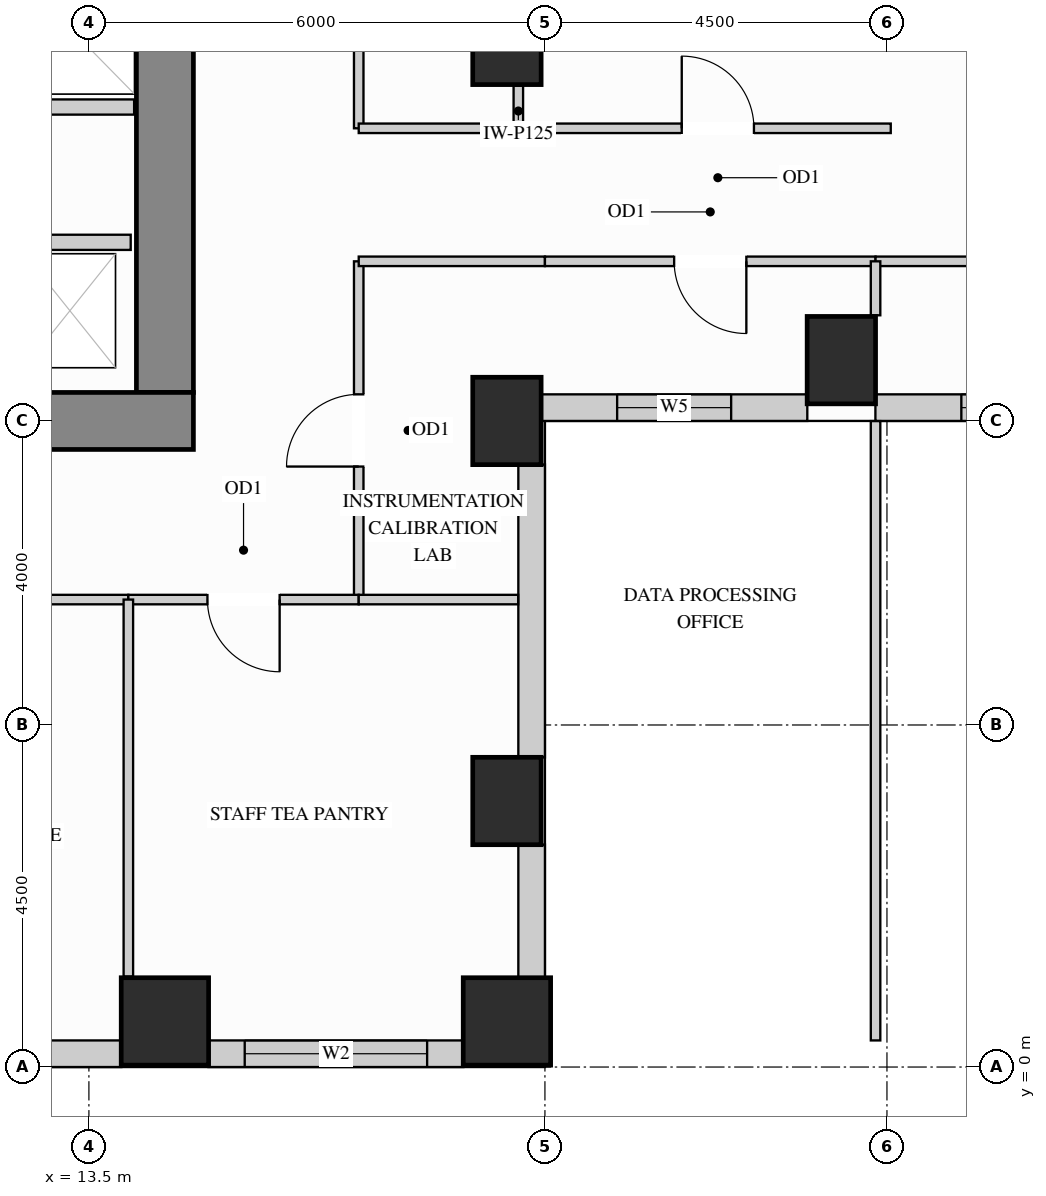
"""IFC4 building model, lengths in metres.
Left out: names, types, materials, properties, quantities, classifications, styles, units other than length and angle.
Written with IfcOpenShell. Run it as: python <this file> out.ifc"""

import sys

from ifc_helpers import new_model, si_unit, direction, frame, frame_2d, origin, origin_2d, place, context, subcontext, project, spatial, rectangle, extrude, source, transform, mapped, element, fill, save


model = new_model("IFC4")
c1 = context("Model", 3, precision=1e-05, world=origin(), true_north=direction((0.0, 1.0)))
c2 = subcontext(c1, "Body", "Model", "MODEL_VIEW")
j1 = project(units=[si_unit("LENGTHUNIT", "METRE"), si_unit("PLANEANGLEUNIT", "RADIAN")], contexts=[c1])
p1 = place(None, origin())
s1 = spatial("IfcSite", under=j1, at=p1, CompositionType="ELEMENT")
p2 = place(p1, origin())
s2 = spatial("IfcBuilding", under=s1, at=p2, CompositionType="ELEMENT")
p3 = place(p2, frame((0.0, 0.0, 120.6)))
s3 = spatial("IfcBuildingStorey", under=s2, at=p3, CompositionType="ELEMENT", Elevation=120.6)
m1 = source(origin(), c2, "Body", "SweptSolid", [
    extrude(rectangle(XDim=0.9, YDim=1.15, at=origin_2d()), origin(), (0.0, 0.0, 1.0), 3.38),
])
for number, where, z_axis, x_axis in (
    (1, (19.0, 13.5, 0.0), (0.0, 0.0, 1.0), (1.0, 0.0, 0.0)),
    (2, (19.0, 3.5, 0.0), (0.0, 0.0, 1.0), (1.0, 0.0, 0.0)),
    (3, (19.0, 8.5, 0.0), (0.0, 0.0, 1.0), (1.0, 0.0, 0.0)),
    (4, (23.4, 9.3, 0.0), (0.0, 0.0, 1.0), (1.0, 0.0, 0.0)),
):
    element("IfcColumn", number, at=place(p3, frame(where, z_axis=z_axis, x_axis=x_axis)), inside=s3, PredefinedType="COLUMN", context=c2, shape_type="MappedRepresentation", body=[
        mapped(m1, transform((0.0, 0.0, 0.0), x_axis=(1.0, 0.0, 0.0), y_axis=(0.0, 1.0, 0.0), z_axis=(0.0, 0.0, 1.0))),
    ])
m2 = source(origin(), c2, "Body", "SweptSolid", [
    extrude(rectangle(XDim=1.15, YDim=1.15, at=origin_2d()), origin(), (0.0, 0.0, 1.0), 3.38),
])
for number, where, z_axis, x_axis in (
    (5, (14.5, 0.6, 0.0), (0.0, 0.0, 1.0), (1.0, 0.0, 0.0)),
    (6, (19.0, 0.6, 0.0), (0.0, 0.0, 1.0), (1.0, 0.0, 0.0)),
):
    element("IfcColumn", number, at=place(p3, frame(where, z_axis=z_axis, x_axis=x_axis)), inside=s3, PredefinedType="COLUMN", context=c2, shape_type="MappedRepresentation", body=[
        mapped(m2, transform((0.0, 0.0, 0.0), x_axis=(1.0, 0.0, 0.0), y_axis=(0.0, 1.0, 0.0), z_axis=(0.0, 0.0, 1.0))),
    ])
m3 = source(origin(), c2, "Body", "SweptSolid", [
    extrude(rectangle(XDim=9.945, YDim=0.75, at=frame_2d((4.973, 0.0))), origin(), (0.0, 0.0, 1.0), 3.38),
])
p4 = place(p3, frame((14.5, 8.875, 0.0), z_axis=(0.0, 0.0, 1.0), x_axis=(0.0, 1.0, 0.0)))
e7 = element("IfcWall", 7, at=p4, inside=s3, PredefinedType="SHEAR", context=c2, shape_type="MappedRepresentation", body=[
    mapped(m3, transform((0.0, 0.0, 0.0), x_axis=(1.0, 0.0, 0.0), y_axis=(0.0, 1.0, 0.0), z_axis=(0.0, 0.0, 1.0))),
])
m4 = source(origin(), c2, "Body", "SweptSolid", [
    extrude(rectangle(XDim=10.75, YDim=0.75, at=frame_2d((5.375, 0.0))), origin(), (0.0, 0.0, 1.0), 3.38),
])
p5 = place(p3, frame((4.125, 8.5, 0.0), z_axis=(0.0, 0.0, 1.0), x_axis=(1.0, 0.0, 0.0)))
e8 = element("IfcWall", 8, at=p5, inside=s3, PredefinedType="SHEAR", context=c2, shape_type="MappedRepresentation", body=[
    mapped(m4, transform((0.0, 0.0, 0.0), x_axis=(1.0, 0.0, 0.0), y_axis=(0.0, 1.0, 0.0), z_axis=(0.0, 0.0, 1.0))),
])
p6 = place(p3, frame((9.573, 0.175, 0.0), z_axis=(0.0, 0.0, 1.0), x_axis=(1.0, 0.0, 0.0)))
e9 = element("IfcWall", 9, at=p6, inside=s3, PredefinedType="SOLIDWALL", context=c2, shape_type="SweptSolid", body=[
    extrude(rectangle(XDim=4.354, YDim=0.35, at=frame_2d((2.177, 0.0))), origin(), (0.0, 0.0, 1.0), 3.365),
])
p7 = place(p6, frame((0.977, 0.0, 0.78)))
e10 = element("IfcOpeningElement", 10, at=p7, cuts=e9, PredefinedType="OPENING", context=c2, shape_type="SweptSolid", body=[
    extrude(rectangle(XDim=2.4, YDim=2.1, at=frame_2d((1.2, 1.05))), frame((0.0, 0.185, 0.0), z_axis=(0.0, -1.0, 0.0), x_axis=(1.0, 0.0, 0.0)), (0.0, 0.0, 1.0), 0.37),
])
p8 = place(p3, frame((15.073, 0.175, 0.0), z_axis=(0.0, 0.0, 1.0), x_axis=(1.0, 0.0, 0.0)))
e11 = element("IfcWall", 11, at=p8, inside=s3, PredefinedType="SOLIDWALL", context=c2, shape_type="SweptSolid", body=[
    extrude(rectangle(XDim=3.354, YDim=0.35, at=frame_2d((1.677, 0.0))), origin(), (0.0, 0.0, 1.0), 3.365),
])
p9 = place(p8, frame((0.477, 0.0, 0.78)))
e12 = element("IfcOpeningElement", 12, at=p9, cuts=e11, PredefinedType="OPENING", context=c2, shape_type="SweptSolid", body=[
    extrude(rectangle(XDim=2.4, YDim=2.1, at=frame_2d((1.2, 1.05))), frame((0.0, 0.185, 0.0), z_axis=(0.0, -1.0, 0.0), x_axis=(1.0, 0.0, 0.0)), (0.0, 0.0, 1.0), 0.37),
])
m5 = source(origin(), c2, "Body", "SweptSolid", [
    extrude(rectangle(XDim=1.754, YDim=0.35, at=frame_2d((0.877, 0.0))), origin(), (0.0, 0.0, 1.0), 2.519),
])
p10 = place(p3, frame((19.325, 1.173, 0.0), z_axis=(0.0, 0.0, 1.0), x_axis=(0.0, 1.0, 0.0)))
e13 = element("IfcWall", 13, at=p10, inside=s3, PredefinedType="SOLIDWALL", context=c2, shape_type="MappedRepresentation", body=[
    mapped(m5, transform((0.0, 0.0, 0.0), x_axis=(1.0, 0.0, 0.0), y_axis=(0.0, 1.0, 0.0), z_axis=(0.0, 0.0, 1.0))),
])
m6 = source(origin(), c2, "Body", "SweptSolid", [
    extrude(rectangle(XDim=3.854, YDim=0.35, at=frame_2d((1.927, 0.0))), origin(), (0.0, 0.0, 1.0), 2.519),
])
p11 = place(p3, frame((19.325, 4.073, 0.0), z_axis=(0.0, 0.0, 1.0), x_axis=(0.0, 1.0, 0.0)))
e14 = element("IfcWall", 14, at=p11, inside=s3, PredefinedType="SOLIDWALL", context=c2, shape_type="MappedRepresentation", body=[
    mapped(m6, transform((0.0, 0.0, 0.0), x_axis=(1.0, 0.0, 0.0), y_axis=(0.0, 1.0, 0.0), z_axis=(0.0, 0.0, 1.0))),
])
p12 = place(p3, frame((19.448, 8.675, 0.0), z_axis=(0.0, 0.0, 1.0), x_axis=(1.0, 0.0, 0.0)))
e15 = element("IfcWall", 15, at=p12, inside=s3, PredefinedType="SOLIDWALL", context=c2, shape_type="SweptSolid", body=[
    extrude(rectangle(XDim=3.504, YDim=0.35, at=frame_2d((1.752, 0.0))), origin(), (0.0, 0.0, 1.0), 3.365),
])
p13 = place(p12, frame((1.002, 0.0, 0.78)))
e16 = element("IfcOpeningElement", 16, at=p13, cuts=e15, PredefinedType="OPENING", context=c2, shape_type="SweptSolid", body=[
    extrude(rectangle(XDim=1.5, YDim=2.0, at=frame_2d((0.75, 1.0))), frame((0.0, 0.185, 0.0), z_axis=(0.0, -1.0, 0.0), x_axis=(1.0, 0.0, 0.0)), (0.0, 0.0, 1.0), 0.37),
])
p14 = place(p3, frame((23.848, 8.675, 0.0), z_axis=(0.0, 0.0, 1.0), x_axis=(1.0, 0.0, 0.0)))
e17 = element("IfcWall", 17, at=p14, inside=s3, PredefinedType="SOLIDWALL", context=c2, shape_type="SweptSolid", body=[
    extrude(rectangle(XDim=6.204, YDim=0.35, at=frame_2d((3.102, 0.0))), origin(), (0.0, 0.0, 1.0), 3.365),
])
p15 = place(p14, frame((1.131, 0.0, 0.78)))
e18 = element("IfcOpeningElement", 18, at=p15, cuts=e17, PredefinedType="OPENING", context=c2, shape_type="SweptSolid", body=[
    extrude(rectangle(XDim=1.5, YDim=2.0, at=frame_2d((0.75, 1.0))), frame((0.0, 0.185, 0.0), z_axis=(0.0, -1.0, 0.0), x_axis=(1.0, 0.0, 0.0)), (0.0, 0.0, 1.0), 0.37),
])
p16 = place(p14, frame((3.441, 0.0, 0.78)))
e19 = element("IfcOpeningElement", 19, at=p16, cuts=e17, PredefinedType="OPENING", context=c2, shape_type="SweptSolid", body=[
    extrude(rectangle(XDim=1.5, YDim=2.0, at=frame_2d((0.75, 1.0))), frame((0.0, 0.185, 0.0), z_axis=(0.0, -1.0, 0.0), x_axis=(1.0, 0.0, 0.0)), (0.0, 0.0, 1.0), 0.37),
])
m7 = source(origin(), c2, "Body", "SweptSolid", [
    extrude(rectangle(XDim=0.56, YDim=0.125, at=frame_2d((0.28, 0.0))), origin(), (0.0, 0.0, 1.0), 2.677),
])
p17 = place(p3, frame((19.15, 12.35, 0.0), z_axis=(0.0, 0.0, 1.0), x_axis=(0.0, 1.0, 0.0)))
e20 = element("IfcWall", 20, at=p17, inside=s3, PredefinedType="PARTITIONING", context=c2, shape_type="MappedRepresentation", body=[
    mapped(m7, transform((0.0, 0.0, 0.0), x_axis=(1.0, 0.0, 0.0), y_axis=(0.0, 1.0, 0.0), z_axis=(0.0, 0.0, 1.0))),
])
p18 = place(p3, frame((17.05, 12.35, 0.0), z_axis=(0.0, 0.0, 1.0), x_axis=(0.0, 1.0, 0.0)))
e21 = element("IfcWall", 21, at=p18, inside=s3, PredefinedType="PARTITIONING", context=c2, shape_type="SweptSolid", body=[
    extrude(rectangle(XDim=6.45, YDim=0.125, at=frame_2d((3.225, 0.0))), origin(), (0.0, 0.0, 1.0), 3.365),
])
p19 = place(p18, frame((2.75, 0.0, 0.0)))
e22 = element("IfcOpeningElement", 22, at=p19, cuts=e21, PredefinedType="OPENING", context=c2, shape_type="SweptSolid", body=[
    extrude(rectangle(XDim=0.95, YDim=2.15, at=frame_2d((0.475, 1.075))), frame((0.0, 0.073, 0.0), z_axis=(0.0, -1.0, 0.0), x_axis=(1.0, 0.0, 0.0)), (0.0, 0.0, 1.0), 0.145),
])
p20 = place(p3, frame((17.05, 6.15, 0.0), z_axis=(0.0, 0.0, 1.0), x_axis=(0.0, 1.0, 0.0)))
e23 = element("IfcWall", 23, at=p20, inside=s3, PredefinedType="PARTITIONING", context=c2, shape_type="SweptSolid", body=[
    extrude(rectangle(XDim=4.45, YDim=0.125, at=frame_2d((2.225, 0.0))), origin(), (0.0, 0.0, 1.0), 3.365),
])
p21 = place(p20, frame((1.75, 0.0, 0.0)))
e24 = element("IfcOpeningElement", 24, at=p21, cuts=e23, PredefinedType="OPENING", context=c2, shape_type="SweptSolid", body=[
    extrude(rectangle(XDim=0.95, YDim=2.15, at=frame_2d((0.475, 1.075))), frame((0.0, 0.073, 0.0), z_axis=(0.0, -1.0, 0.0), x_axis=(1.0, 0.0, 0.0)), (0.0, 0.0, 1.0), 0.145),
])
m8 = source(origin(), c2, "Body", "SweptSolid", [
    extrude(rectangle(XDim=2.45, YDim=0.125, at=frame_2d((1.225, 0.0))), origin(), (0.0, 0.0, 1.0), 3.365),
])
p22 = place(p3, frame((17.05, 12.35, 0.0), z_axis=(0.0, 0.0, 1.0), x_axis=(1.0, 0.0, 0.0)))
e25 = element("IfcWall", 25, at=p22, inside=s3, PredefinedType="PARTITIONING", context=c2, shape_type="MappedRepresentation", body=[
    mapped(m8, transform((0.0, 0.0, 0.0), x_axis=(1.0, 0.0, 0.0), y_axis=(0.0, 1.0, 0.0), z_axis=(0.0, 0.0, 1.0))),
])
p23 = place(p3, frame((19.5, 12.35, 0.0), z_axis=(0.0, 0.0, 1.0), x_axis=(1.0, 0.0, 0.0)))
e26 = element("IfcWall", 26, at=p23, inside=s3, PredefinedType="PARTITIONING", context=c2, shape_type="SweptSolid", body=[
    extrude(rectangle(XDim=4.55, YDim=0.125, at=frame_2d((2.275, 0.0))), origin(), (0.0, 0.0, 1.0), 3.365),
])
p24 = place(p23, frame((1.8, 0.0, 0.0)))
e27 = element("IfcOpeningElement", 27, at=p24, cuts=e26, PredefinedType="OPENING", context=c2, shape_type="SweptSolid", body=[
    extrude(rectangle(XDim=0.95, YDim=2.15, at=frame_2d((0.475, 1.075))), frame((0.0, 0.073, 0.0), z_axis=(0.0, -1.0, 0.0), x_axis=(1.0, 0.0, 0.0)), (0.0, 0.0, 1.0), 0.145),
])
p25 = place(p3, frame((17.05, 10.6, 0.0), z_axis=(0.0, 0.0, 1.0), x_axis=(1.0, 0.0, 0.0)))
e28 = element("IfcWall", 28, at=p25, inside=s3, PredefinedType="PARTITIONING", context=c2, shape_type="MappedRepresentation", body=[
    mapped(m8, transform((0.0, 0.0, 0.0), x_axis=(1.0, 0.0, 0.0), y_axis=(0.0, 1.0, 0.0), z_axis=(0.0, 0.0, 1.0))),
])
p26 = place(p3, frame((19.5, 10.6, 0.0), z_axis=(0.0, 0.0, 1.0), x_axis=(1.0, 0.0, 0.0)))
e29 = element("IfcWall", 29, at=p26, inside=s3, PredefinedType="PARTITIONING", context=c2, shape_type="SweptSolid", body=[
    extrude(rectangle(XDim=4.35, YDim=0.125, at=frame_2d((2.175, 0.0))), origin(), (0.0, 0.0, 1.0), 3.365),
])
p27 = place(p26, frame((1.7, 0.0, 0.0)))
e30 = element("IfcOpeningElement", 30, at=p27, cuts=e29, PredefinedType="OPENING", context=c2, shape_type="SweptSolid", body=[
    extrude(rectangle(XDim=0.95, YDim=2.15, at=frame_2d((0.475, 1.075))), frame((0.0, 0.073, 0.0), z_axis=(0.0, -1.0, 0.0), x_axis=(1.0, 0.0, 0.0)), (0.0, 0.0, 1.0), 0.145),
])
p28 = place(p3, frame((23.85, 10.6, 0.0), z_axis=(0.0, 0.0, 1.0), x_axis=(1.0, 0.0, 0.0)))
e31 = element("IfcWall", 31, at=p28, inside=s3, PredefinedType="PARTITIONING", context=c2, shape_type="SweptSolid", body=[
    extrude(rectangle(XDim=6.0, YDim=0.125, at=frame_2d((3.0, 0.0))), origin(), (0.0, 0.0, 1.0), 3.365),
])
p29 = place(p28, frame((2.525, 0.0, 0.0)))
e32 = element("IfcOpeningElement", 32, at=p29, cuts=e31, PredefinedType="OPENING", context=c2, shape_type="SweptSolid", body=[
    extrude(rectangle(XDim=0.95, YDim=2.15, at=frame_2d((0.475, 1.075))), frame((0.0, 0.073, 0.0), z_axis=(0.0, -1.0, 0.0), x_axis=(1.0, 0.0, 0.0)), (0.0, 0.0, 1.0), 0.145),
])
m9 = source(origin(), c2, "Body", "SweptSolid", [
    extrude(rectangle(XDim=8.148, YDim=0.125, at=frame_2d((4.074, 0.0))), origin(), (0.0, 0.0, 1.0), 3.365),
])
p30 = place(p3, frame((23.85, 0.35, 0.0), z_axis=(0.0, 0.0, 1.0), x_axis=(0.0, 1.0, 0.0)))
e33 = element("IfcWall", 33, at=p30, inside=s3, PredefinedType="PARTITIONING", context=c2, shape_type="MappedRepresentation", body=[
    mapped(m9, transform((0.0, 0.0, 0.0), x_axis=(1.0, 0.0, 0.0), y_axis=(0.0, 1.0, 0.0), z_axis=(0.0, 0.0, 1.0))),
])
m10 = source(origin(), c2, "Body", "SweptSolid", [
    extrude(rectangle(XDim=0.71, YDim=0.125, at=frame_2d((0.355, 0.0))), origin(), (0.0, 0.0, 1.0), 3.365),
])
p31 = place(p3, frame((23.85, 9.89, 0.0), z_axis=(0.0, 0.0, 1.0), x_axis=(0.0, 1.0, 0.0)))
e34 = element("IfcWall", 34, at=p31, inside=s3, PredefinedType="PARTITIONING", context=c2, shape_type="MappedRepresentation", body=[
    mapped(m10, transform((0.0, 0.0, 0.0), x_axis=(1.0, 0.0, 0.0), y_axis=(0.0, 1.0, 0.0), z_axis=(0.0, 0.0, 1.0))),
])
p32 = place(p3, frame((8.392, 6.15, 0.0), z_axis=(0.0, 0.0, 1.0), x_axis=(1.0, 0.0, 0.0)))
e35 = element("IfcWall", 35, at=p32, inside=s3, PredefinedType="PARTITIONING", context=c2, shape_type="SweptSolid", body=[
    extrude(rectangle(XDim=5.627, YDim=0.125, at=frame_2d((2.813, 0.0))), origin(), (0.0, 0.0, 1.0), 3.365),
])
p33 = place(p32, frame((2.338, 0.0, 0.0)))
e36 = element("IfcOpeningElement", 36, at=p33, cuts=e35, PredefinedType="OPENING", context=c2, shape_type="SweptSolid", body=[
    extrude(rectangle(XDim=0.95, YDim=2.15, at=frame_2d((0.475, 1.075))), frame((0.0, 0.073, 0.0), z_axis=(0.0, -1.0, 0.0), x_axis=(1.0, 0.0, 0.0)), (0.0, 0.0, 1.0), 0.145),
])
p34 = place(p3, frame((14.019, 6.15, 0.0), z_axis=(0.0, 0.0, 1.0), x_axis=(1.0, 0.0, 0.0)))
e37 = element("IfcWall", 37, at=p34, inside=s3, PredefinedType="PARTITIONING", context=c2, shape_type="SweptSolid", body=[
    extrude(rectangle(XDim=3.031, YDim=0.125, at=frame_2d((1.516, 0.0))), origin(), (0.0, 0.0, 1.0), 3.365),
])
p35 = place(p34, frame((1.041, 0.0, 0.0)))
e38 = element("IfcOpeningElement", 38, at=p35, cuts=e37, PredefinedType="OPENING", context=c2, shape_type="SweptSolid", body=[
    extrude(rectangle(XDim=0.95, YDim=2.15, at=frame_2d((0.475, 1.075))), frame((0.0, 0.073, 0.0), z_axis=(0.0, -1.0, 0.0), x_axis=(1.0, 0.0, 0.0)), (0.0, 0.0, 1.0), 0.145),
])
m11 = source(origin(), c2, "Body", "SweptSolid", [
    extrude(rectangle(XDim=2.098, YDim=0.125, at=frame_2d((1.049, 0.0))), origin(), (0.0, 0.0, 1.0), 3.365),
])
p36 = place(p3, frame((17.05, 6.15, 0.0), z_axis=(0.0, 0.0, 1.0), x_axis=(1.0, 0.0, 0.0)))
e39 = element("IfcWall", 39, at=p36, inside=s3, PredefinedType="PARTITIONING", context=c2, shape_type="MappedRepresentation", body=[
    mapped(m11, transform((0.0, 0.0, 0.0), x_axis=(1.0, 0.0, 0.0), y_axis=(0.0, 1.0, 0.0), z_axis=(0.0, 0.0, 1.0))),
])
m12 = source(origin(), c2, "Body", "SweptSolid", [
    extrude(rectangle(XDim=4.96, YDim=0.125, at=frame_2d((2.48, 0.0))), origin(), (0.0, 0.0, 1.0), 3.365),
])
p37 = place(p3, frame((14.019, 1.19, 0.0), z_axis=(0.0, 0.0, 1.0), x_axis=(0.0, 1.0, 0.0)))
e40 = element("IfcWall", 40, at=p37, inside=s3, PredefinedType="PARTITIONING", context=c2, shape_type="MappedRepresentation", body=[
    mapped(m12, transform((0.0, 0.0, 0.0), x_axis=(1.0, 0.0, 0.0), y_axis=(0.0, 1.0, 0.0), z_axis=(0.0, 0.0, 1.0))),
])
m13 = source(origin(), c2, "Body", "SweptSolid", [
    extrude(rectangle(XDim=1.63, YDim=0.2, at=frame_2d((0.815, 0.0))), origin(), (0.0, 0.0, 1.0), 3.365),
])
p38 = place(p3, frame((12.42, 10.85, 0.0), z_axis=(0.0, 0.0, 1.0), x_axis=(1.0, 0.0, 0.0)))
e41 = element("IfcWall", 41, at=p38, inside=s3, PredefinedType="PARTITIONING", context=c2, shape_type="MappedRepresentation", body=[
    mapped(m13, transform((0.0, 0.0, 0.0), x_axis=(1.0, 0.0, 0.0), y_axis=(0.0, 1.0, 0.0), z_axis=(0.0, 0.0, 1.0))),
])
m14 = source(origin(), c2, "Body", "SweptSolid", [
    extrude(rectangle(XDim=1.865, YDim=0.2, at=frame_2d((0.933, 0.0))), origin(), (0.0, 0.0, 1.0), 3.365),
])
p39 = place(p3, frame((12.23, 12.63, 0.0), z_axis=(0.0, 0.0, 1.0), x_axis=(1.0, 0.0, 0.0)))
e42 = element("IfcWall", 42, at=p39, inside=s3, PredefinedType="PARTITIONING", context=c2, shape_type="MappedRepresentation", body=[
    mapped(m14, transform((0.0, 0.0, 0.0), x_axis=(1.0, 0.0, 0.0), y_axis=(0.0, 1.0, 0.0), z_axis=(0.0, 0.0, 1.0))),
])
m15 = source(origin(), c2, "Body", "SweptSolid", [
    extrude(rectangle(XDim=0.95, YDim=2.15, at=frame_2d((0.475, 1.075))), frame((0.0, 0.025, 0.0), z_axis=(0.0, -1.0, 0.0), x_axis=(1.0, 0.0, 0.0)), (0.0, 0.0, 1.0), 0.05),
])
p40 = place(p21, origin())
e43 = element("IfcDoor", 43, at=p40, inside=s3, OperationType="SINGLE_SWING_LEFT", PredefinedType="DOOR", context=c2, shape_type="MappedRepresentation", body=[
    mapped(m15, transform((0.0, 0.0, 0.0), x_axis=(1.0, 0.0, 0.0), y_axis=(0.0, 1.0, 0.0), z_axis=(0.0, 0.0, 1.0))),
])
fill(e24, e43)
p41 = place(p35, origin())
e44 = element("IfcDoor", 44, at=p41, inside=s3, OperationType="SINGLE_SWING_RIGHT", PredefinedType="DOOR", context=c2, shape_type="MappedRepresentation", body=[
    mapped(m15, transform((0.0, 0.0, 0.0), x_axis=(1.0, 0.0, 0.0), y_axis=(0.0, 1.0, 0.0), z_axis=(0.0, 0.0, 1.0))),
])
fill(e38, e44)
p42 = place(p24, origin())
e45 = element("IfcDoor", 45, at=p42, inside=s3, OperationType="SINGLE_SWING_LEFT", PredefinedType="DOOR", context=c2, shape_type="MappedRepresentation", body=[
    mapped(m15, transform((0.0, 0.0, 0.0), x_axis=(1.0, 0.0, 0.0), y_axis=(0.0, 1.0, 0.0), z_axis=(0.0, 0.0, 1.0))),
])
fill(e27, e45)
p43 = place(p27, origin())
e46 = element("IfcDoor", 46, at=p43, inside=s3, OperationType="SINGLE_SWING_RIGHT", PredefinedType="DOOR", context=c2, shape_type="MappedRepresentation", body=[
    mapped(m15, transform((0.0, 0.0, 0.0), x_axis=(1.0, 0.0, 0.0), y_axis=(0.0, 1.0, 0.0), z_axis=(0.0, 0.0, 1.0))),
])
fill(e30, e46)
m16 = source(origin(), c2, "Body", "SweptSolid", [
    extrude(rectangle(XDim=2.4, YDim=2.1, at=frame_2d((1.2, 1.05))), frame((0.0, 0.03, 0.0), z_axis=(0.0, -1.0, 0.0), x_axis=(1.0, 0.0, 0.0)), (0.0, 0.0, 1.0), 0.06),
])
p44 = place(p9, origin())
e47 = element("IfcWindow", 47, at=p44, inside=s3, PartitioningType="SINGLE_PANEL", PredefinedType="WINDOW", context=c2, shape_type="MappedRepresentation", body=[
    mapped(m16, transform((0.0, 0.0, 0.0), x_axis=(1.0, 0.0, 0.0), y_axis=(0.0, 1.0, 0.0), z_axis=(0.0, 0.0, 1.0))),
])
fill(e12, e47)
m17 = source(origin(), c2, "Body", "SweptSolid", [
    extrude(rectangle(XDim=1.5, YDim=2.0, at=frame_2d((0.75, 1.0))), frame((0.0, 0.03, 0.0), z_axis=(0.0, -1.0, 0.0), x_axis=(1.0, 0.0, 0.0)), (0.0, 0.0, 1.0), 0.06),
])
p45 = place(p13, origin())
e48 = element("IfcWindow", 48, at=p45, inside=s3, PartitioningType="SINGLE_PANEL", PredefinedType="WINDOW", context=c2, shape_type="MappedRepresentation", body=[
    mapped(m17, transform((0.0, 0.0, 0.0), x_axis=(1.0, 0.0, 0.0), y_axis=(0.0, 1.0, 0.0), z_axis=(0.0, 0.0, 1.0))),
])
fill(e16, e48)
p46 = place(p15, origin())
e49 = element("IfcWindow", 49, at=p46, inside=s3, PartitioningType="SINGLE_PANEL", PredefinedType="WINDOW", context=c2, shape_type="MappedRepresentation", body=[
    mapped(m17, transform((0.0, 0.0, 0.0), x_axis=(1.0, 0.0, 0.0), y_axis=(0.0, 1.0, 0.0), z_axis=(0.0, 0.0, 1.0))),
])
fill(e18, e49)
save(model, sys.argv[1])
